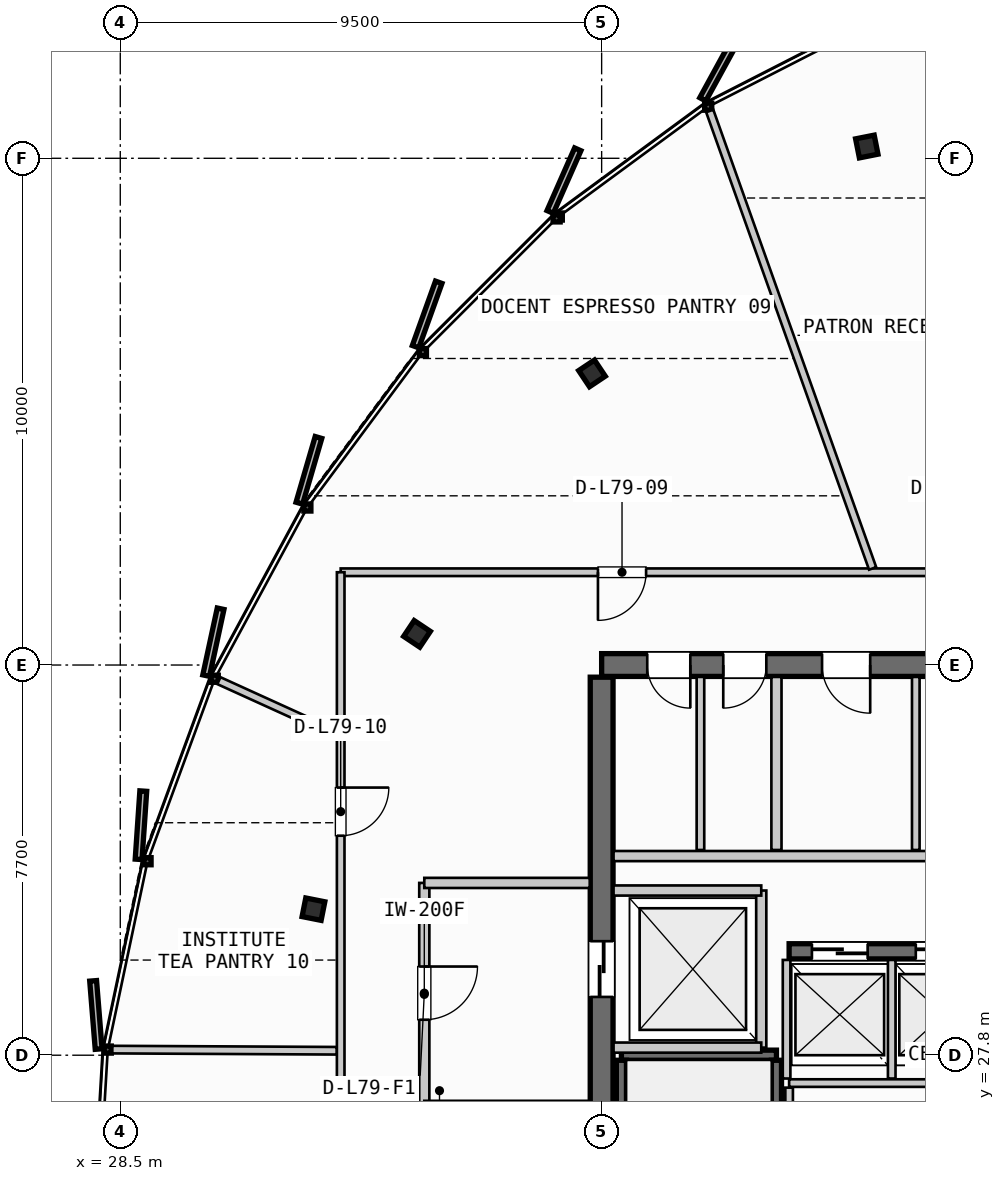
"""IFC4 building model, lengths in metres.
Left out: names, types, materials, properties, quantities, classifications, styles, units other than length and angle.
Written with IfcOpenShell. Run it as: python <this file> out.ifc"""

import sys

from ifc_helpers import new_model, si_unit, direction, frame, frame_2d, origin, origin_2d, place, context, subcontext, project, spatial, rectangle, i_section, extrude, source, transform, mapped, element, fill, save


model = new_model("IFC4")
c1 = context("Model", 3, precision=1e-05, world=origin(), true_north=direction((0.0, 1.0)))
c2 = subcontext(c1, "Body", "Model", "MODEL_VIEW")
j1 = project(units=[si_unit("LENGTHUNIT", "METRE"), si_unit("PLANEANGLEUNIT", "RADIAN")], contexts=[c1])
p1 = place(None, origin())
s1 = spatial("IfcSite", under=j1, at=p1, CompositionType="ELEMENT")
p2 = place(p1, origin())
s2 = spatial("IfcBuilding", under=s1, at=p2, CompositionType="ELEMENT")
p3 = place(p2, frame((0.0, 0.0, 297.4)))
s3 = spatial("IfcBuildingStorey", under=s2, at=p3, CompositionType="ELEMENT", Elevation=297.4)
p4 = place(p3, frame((55.6, 35.5, 0.0), z_axis=(0.0, 0.0, 1.0), x_axis=(-1.0, 0.0, 0.0)))
e1 = element("IfcWall", 1, at=p4, inside=s3, PredefinedType="SHEAR", context=c2, shape_type="SweptSolid", body=[
    extrude(rectangle(XDim=17.6, YDim=0.45, at=frame_2d((8.8, 0.0))), origin(), (0.0, 0.0, 1.0), 3.21),
])
p5 = place(p4, frame((8.05, 0.0, 0.0)))
e2 = element("IfcOpeningElement", 2, at=p5, cuts=e1, PredefinedType="OPENING", context=c2, shape_type="SweptSolid", body=[
    extrude(rectangle(XDim=1.5, YDim=2.2, at=frame_2d((0.75, 1.1))), frame((0.0, 0.235, 0.0), z_axis=(0.0, -1.0, 0.0), x_axis=(1.0, 0.0, 0.0)), (0.0, 0.0, 1.0), 0.47),
])
p6 = place(p4, frame((15.85, 0.0, 0.0)))
e3 = element("IfcOpeningElement", 3, at=p6, cuts=e1, PredefinedType="OPENING", context=c2, shape_type="SweptSolid", body=[
    extrude(rectangle(XDim=0.85, YDim=2.15, at=frame_2d((0.425, 1.075))), frame((0.0, 0.235, 0.0), z_axis=(0.0, -1.0, 0.0), x_axis=(1.0, 0.0, 0.0)), (0.0, 0.0, 1.0), 0.47),
])
p7 = place(p4, frame((14.35, 0.0, 0.0)))
e4 = element("IfcOpeningElement", 4, at=p7, cuts=e1, PredefinedType="OPENING", context=c2, shape_type="SweptSolid", body=[
    extrude(rectangle(XDim=0.85, YDim=2.15, at=frame_2d((0.425, 1.075))), frame((0.0, 0.235, 0.0), z_axis=(0.0, -1.0, 0.0), x_axis=(1.0, 0.0, 0.0)), (0.0, 0.0, 1.0), 0.47),
])
p8 = place(p4, frame((12.3, 0.0, 0.0)))
e5 = element("IfcOpeningElement", 5, at=p8, cuts=e1, PredefinedType="OPENING", context=c2, shape_type="SweptSolid", body=[
    extrude(rectangle(XDim=0.95, YDim=2.15, at=frame_2d((0.475, 1.075))), frame((0.0, 0.235, 0.0), z_axis=(0.0, -1.0, 0.0), x_axis=(1.0, 0.0, 0.0)), (0.0, 0.0, 1.0), 0.47),
])
p9 = place(p4, frame((10.2, 0.0, 0.0)))
e6 = element("IfcOpeningElement", 6, at=p9, cuts=e1, PredefinedType="OPENING", context=c2, shape_type="SweptSolid", body=[
    extrude(rectangle(XDim=0.9, YDim=2.15, at=frame_2d((0.45, 1.075))), frame((0.0, 0.235, 0.0), z_axis=(0.0, -1.0, 0.0), x_axis=(1.0, 0.0, 0.0)), (0.0, 0.0, 1.0), 0.47),
])
p10 = place(p3, frame((38.0, 35.26, 0.0), z_axis=(0.0, 0.0, 1.0), x_axis=(0.0, -1.0, 0.0)))
e7 = element("IfcWall", 7, at=p10, inside=s3, PredefinedType="SHEAR", context=c2, shape_type="SweptSolid", body=[
    extrude(rectangle(XDim=14.92, YDim=0.45, at=frame_2d((7.46, 0.0))), origin(), (0.0, 0.0, 1.0), 3.21),
])
p11 = place(p10, frame((5.21, 0.0, 0.0)))
e8 = element("IfcOpeningElement", 8, at=p11, cuts=e7, PredefinedType="OPENING", context=c2, shape_type="SweptSolid", body=[
    extrude(rectangle(XDim=1.1, YDim=2.2, at=frame_2d((0.55, 1.1))), frame((0.0, 0.235, 0.0), z_axis=(0.0, -1.0, 0.0), x_axis=(1.0, 0.0, 0.0)), (0.0, 0.0, 1.0), 0.47),
])
p12 = place(p3, frame((41.7, 29.85, 0.0), z_axis=(0.0, 0.0, 1.0), x_axis=(1.0, 0.0, 0.0)))
e9 = element("IfcWall", 9, at=p12, inside=s3, PredefinedType="SHEAR", context=c2, shape_type="SweptSolid", body=[
    extrude(rectangle(XDim=4.25, YDim=0.3, at=frame_2d((2.125, 0.0))), origin(), (0.0, 0.0, 1.0), 3.21),
])
p13 = place(p12, frame((0.45, 0.0, 0.0)))
e10 = element("IfcOpeningElement", 10, at=p13, cuts=e9, PredefinedType="OPENING", context=c2, shape_type="SweptSolid", body=[
    extrude(rectangle(XDim=1.1, YDim=2.2, at=frame_2d((0.55, 1.1))), frame((0.0, 0.16, 0.0), z_axis=(0.0, -1.0, 0.0), x_axis=(1.0, 0.0, 0.0)), (0.0, 0.0, 1.0), 0.32),
])
p14 = place(p12, frame((2.5, 0.0, 0.0)))
e11 = element("IfcOpeningElement", 11, at=p14, cuts=e9, PredefinedType="OPENING", context=c2, shape_type="SweptSolid", body=[
    extrude(rectangle(XDim=1.1, YDim=2.2, at=frame_2d((0.55, 1.1))), frame((0.0, 0.16, 0.0), z_axis=(0.0, -1.0, 0.0), x_axis=(1.0, 0.0, 0.0)), (0.0, 0.0, 1.0), 0.32),
])
m1 = source(origin(), c2, "Body", "SweptSolid", [
    extrude(i_section(OverallWidth=0.374, OverallDepth=0.383, WebThickness=0.017, FlangeThickness=0.026, FilletRadius=0.015, at=origin_2d()), origin(), (0.0, 0.0, 1.0), 3.21),
])
for number, where, z_axis, x_axis in (
    (12, (43.233, 45.732, 0.0), (0.0, 0.0, 1.0), (-0.195, 0.981, 0.0)),
    (13, (37.81, 41.255, 0.0), (0.0, 0.0, 1.0), (-0.556, 0.831, 0.0)),
    (14, (34.356, 36.115, 0.0), (0.0, 0.0, 1.0), (-0.831, 0.556, 0.0)),
    (15, (32.312, 30.682, 0.0), (0.0, 0.0, 1.0), (-0.981, 0.195, 0.0)),
):
    element("IfcColumn", number, at=place(p3, frame(where, z_axis=z_axis, x_axis=x_axis)), inside=s3, PredefinedType="COLUMN", context=c2, shape_type="MappedRepresentation", body=[
        mapped(m1, transform((0.0, 0.0, 0.0), scale=1.0)),
    ])
p15 = place(p3, frame((38.39, 27.8, 0.0), z_axis=(0.0, 0.0, 1.0), x_axis=(1.0, 0.0, 0.0)))
e16 = element("IfcWall", 16, at=p15, inside=s3, PredefinedType="SHEAR", context=c2, shape_type="SweptSolid", body=[
    extrude(rectangle(XDim=3.06, YDim=0.2, at=frame_2d((1.53, 0.0))), origin(), (0.0, 0.0, 1.0), 3.21),
])
for number, where, z_axis, x_axis in (
    (17, (41.45, 27.7, 0.0), (0.0, 0.0, 1.0), (0.0, -1.0, 0.0)),
    (18, (38.39, 20.35, 0.0), (0.0, 0.0, 1.0), (0.0, 1.0, 0.0)),
):
    element("IfcWall", number, at=place(p3, frame(where, z_axis=z_axis, x_axis=x_axis)), inside=s3, PredefinedType="SHEAR", context=c2, shape_type="SweptSolid", body=[
        extrude(rectangle(XDim=7.35, YDim=0.2, at=frame_2d((3.675, 0.0))), origin(), (0.0, 0.0, 1.0), 3.21),
    ])
p16 = place(p3, frame((41.15, 27.95, 0.0), z_axis=(0.0, 0.0, 1.0), x_axis=(0.0, 1.0, 0.0)))
e19 = element("IfcWall", 19, at=p16, inside=s3, PredefinedType="PARTITIONING", context=c2, shape_type="SweptSolid", body=[
    extrude(rectangle(XDim=3.1, YDim=0.2, at=frame_2d((1.55, 0.0))), origin(), (0.0, 0.0, 1.0), 2.28),
])
for number, where, z_axis, x_axis in (
    (20, (38.235, 27.95, 0.0), (0.0, 0.0, 1.0), (1.0, 0.0, 0.0)),
    (21, (38.235, 31.05, 0.0), (0.0, 0.0, 1.0), (1.0, 0.0, 0.0)),
):
    element("IfcWall", number, at=place(p3, frame(where, z_axis=z_axis, x_axis=x_axis)), inside=s3, PredefinedType="PARTITIONING", context=c2, shape_type="SweptSolid", body=[
        extrude(rectangle(XDim=2.915, YDim=0.2, at=frame_2d((1.458, 0.0))), origin(), (0.0, 0.0, 1.0), 2.28),
    ])
p17 = place(p3, frame((34.5, 31.2, 0.0), z_axis=(0.0, 0.0, 1.0), x_axis=(0.0, -1.0, 0.0)))
e22 = element("IfcWall", 22, at=p17, inside=s3, PredefinedType="PARTITIONING", context=c2, shape_type="SweptSolid", body=[
    extrude(rectangle(XDim=4.4, YDim=0.2, at=frame_2d((2.2, 0.0))), origin(), (0.0, 0.0, 1.0), 2.28),
])
p18 = place(p17, frame((1.65, 0.0, 0.0)))
e23 = element("IfcOpeningElement", 23, at=p18, cuts=e22, PredefinedType="OPENING", context=c2, shape_type="SweptSolid", body=[
    extrude(rectangle(XDim=1.05, YDim=2.15, at=frame_2d((0.525, 1.075))), frame((0.0, 0.11, 0.0), z_axis=(0.0, -1.0, 0.0), x_axis=(1.0, 0.0, 0.0)), (0.0, 0.0, 1.0), 0.22),
])
for number, where, z_axis, x_axis in (
    (24, (34.5, 26.8, 0.0), (0.0, 0.0, 1.0), (1.0, 0.0, 0.0)),
    (25, (34.5, 31.2, 0.0), (0.0, 0.0, 1.0), (1.0, 0.0, 0.0)),
):
    element("IfcWall", number, at=place(p3, frame(where, z_axis=z_axis, x_axis=x_axis)), inside=s3, PredefinedType="PARTITIONING", context=c2, shape_type="SweptSolid", body=[
        extrude(rectangle(XDim=3.265, YDim=0.2, at=frame_2d((1.632, 0.0))), origin(), (0.0, 0.0, 1.0), 2.28),
    ])
p19 = place(p3, frame((41.7, 27.25, 0.0), z_axis=(0.0, 0.0, 1.0), x_axis=(1.0, 0.0, 0.0)))
e26 = element("IfcWall", 26, at=p19, inside=s3, PredefinedType="PARTITIONING", context=c2, shape_type="SweptSolid", body=[
    extrude(rectangle(XDim=4.25, YDim=0.15, at=frame_2d((2.125, 0.0))), origin(), (0.0, 0.0, 1.0), 2.28),
])
p20 = place(p3, frame((41.7, 24.92, 0.0), z_axis=(0.0, 0.0, 1.0), x_axis=(0.0, 1.0, 0.0)))
e27 = element("IfcWall", 27, at=p20, inside=s3, PredefinedType="PARTITIONING", context=c2, shape_type="SweptSolid", body=[
    extrude(rectangle(XDim=2.24, YDim=0.15, at=frame_2d((1.12, 0.0))), origin(), (0.0, 0.0, 1.0), 2.28),
])
for number, where, z_axis, x_axis in (
    (28, (41.65, 27.34, 0.0), (0.0, 0.0, 1.0), (0.0, 1.0, 0.0)),
    (29, (43.725, 27.34, 0.0), (0.0, 0.0, 1.0), (0.0, 1.0, 0.0)),
):
    element("IfcWall", number, at=place(p3, frame(where, z_axis=z_axis, x_axis=x_axis)), inside=s3, PredefinedType="PARTITIONING", context=c2, shape_type="SweptSolid", body=[
        extrude(rectangle(XDim=2.34, YDim=0.15, at=frame_2d((1.17, 0.0))), origin(), (0.0, 0.0, 1.0), 2.28),
    ])
p21 = place(p3, frame((41.45, 31.85, 0.0), z_axis=(0.0, 0.0, 1.0), x_axis=(0.0, 1.0, 0.0)))
e30 = element("IfcWall", 30, at=p21, inside=s3, PredefinedType="PARTITIONING", context=c2, shape_type="SweptSolid", body=[
    extrude(rectangle(XDim=3.415, YDim=0.2, at=frame_2d((1.708, 0.0))), origin(), (0.0, 0.0, 1.0), 2.28),
])
p22 = place(p3, frame((38.235, 31.73, 0.0), z_axis=(0.0, 0.0, 1.0), x_axis=(1.0, 0.0, 0.0)))
e31 = element("IfcWall", 31, at=p22, inside=s3, PredefinedType="PARTITIONING", context=c2, shape_type="SweptSolid", body=[
    extrude(rectangle(XDim=7.565, YDim=0.2, at=frame_2d((3.782, 0.0))), origin(), (0.0, 0.0, 1.0), 2.28),
])
p23 = place(p3, frame((39.95, 31.85, 0.0), z_axis=(0.0, 0.0, 1.0), x_axis=(0.0, 1.0, 0.0)))
e32 = element("IfcWall", 32, at=p23, inside=s3, PredefinedType="PARTITIONING", context=c2, shape_type="SweptSolid", body=[
    extrude(rectangle(XDim=3.415, YDim=0.15, at=frame_2d((1.708, 0.0))), origin(), (0.0, 0.0, 1.0), 2.28),
])
p24 = place(p3, frame((44.2, 31.85, 0.0), z_axis=(0.0, 0.0, 1.0), x_axis=(0.0, 1.0, 0.0)))
e33 = element("IfcWall", 33, at=p24, inside=s3, PredefinedType="PLUMBINGWALL", context=c2, shape_type="SweptSolid", body=[
    extrude(rectangle(XDim=3.415, YDim=0.15, at=frame_2d((1.708, 0.0))), origin(), (0.0, 0.0, 1.0), 2.28),
])
p25 = place(p3, frame((60.888, 37.331, 0.0), z_axis=(0.0, 0.0, 1.0), x_axis=(-1.0, 0.0, 0.0)))
e34 = element("IfcWall", 34, at=p25, inside=s3, PredefinedType="PARTITIONING", context=c2, shape_type="SweptSolid", body=[
    extrude(rectangle(XDim=28.038, YDim=0.15, at=frame_2d((14.019, 0.0))), origin(), (0.0, 0.0, 1.0), 2.28),
])
p26 = place(p25, frame((3.903, 0.0, 0.0)))
e35 = element("IfcOpeningElement", 35, at=p26, cuts=e34, PredefinedType="OPENING", context=c2, shape_type="SweptSolid", body=[
    extrude(rectangle(XDim=0.95, YDim=2.15, at=frame_2d((0.475, 1.075))), frame((0.0, 0.085, 0.0), z_axis=(0.0, -1.0, 0.0), x_axis=(1.0, 0.0, 0.0)), (0.0, 0.0, 1.0), 0.17),
])
p27 = place(p25, frame((9.534, 0.0, 0.0)))
e36 = element("IfcOpeningElement", 36, at=p27, cuts=e34, PredefinedType="OPENING", context=c2, shape_type="SweptSolid", body=[
    extrude(rectangle(XDim=0.95, YDim=2.15, at=frame_2d((0.475, 1.075))), frame((0.0, 0.085, 0.0), z_axis=(0.0, -1.0, 0.0), x_axis=(1.0, 0.0, 0.0)), (0.0, 0.0, 1.0), 0.17),
])
p28 = place(p25, frame((15.393, 0.0, 0.0)))
e37 = element("IfcOpeningElement", 37, at=p28, cuts=e34, PredefinedType="OPENING", context=c2, shape_type="SweptSolid", body=[
    extrude(rectangle(XDim=0.95, YDim=2.15, at=frame_2d((0.475, 1.075))), frame((0.0, 0.085, 0.0), z_axis=(0.0, -1.0, 0.0), x_axis=(1.0, 0.0, 0.0)), (0.0, 0.0, 1.0), 0.17),
])
p29 = place(p25, frame((22.011, 0.0, 0.0)))
e38 = element("IfcOpeningElement", 38, at=p29, cuts=e34, PredefinedType="OPENING", context=c2, shape_type="SweptSolid", body=[
    extrude(rectangle(XDim=0.95, YDim=2.15, at=frame_2d((0.475, 1.075))), frame((0.0, 0.085, 0.0), z_axis=(0.0, -1.0, 0.0), x_axis=(1.0, 0.0, 0.0)), (0.0, 0.0, 1.0), 0.17),
])
p30 = place(p3, frame((32.85, 37.331, 0.0), z_axis=(0.0, 0.0, 1.0), x_axis=(0.0, -1.0, 0.0)))
e39 = element("IfcWall", 39, at=p30, inside=s3, PredefinedType="PARTITIONING", context=c2, shape_type="SweptSolid", body=[
    extrude(rectangle(XDim=19.524, YDim=0.15, at=frame_2d((9.762, 0.0))), origin(), (0.0, 0.0, 1.0), 2.28),
])
p31 = place(p30, frame((4.249, 0.0, 0.0)))
e40 = element("IfcOpeningElement", 40, at=p31, cuts=e39, PredefinedType="OPENING", context=c2, shape_type="SweptSolid", body=[
    extrude(rectangle(XDim=0.95, YDim=2.15, at=frame_2d((0.475, 1.075))), frame((0.0, 0.085, 0.0), z_axis=(0.0, -1.0, 0.0), x_axis=(1.0, 0.0, 0.0)), (0.0, 0.0, 1.0), 0.17),
])
p32 = place(p30, frame((13.719, 0.0, 0.0)))
e41 = element("IfcOpeningElement", 41, at=p32, cuts=e39, PredefinedType="OPENING", context=c2, shape_type="SweptSolid", body=[
    extrude(rectangle(XDim=0.95, YDim=2.15, at=frame_2d((0.475, 1.075))), frame((0.0, 0.085, 0.0), z_axis=(0.0, -1.0, 0.0), x_axis=(1.0, 0.0, 0.0)), (0.0, 0.0, 1.0), 0.17),
])
p33 = place(p3, frame((43.348, 37.406, 0.0), z_axis=(0.0, 0.0, 1.0), x_axis=(-0.335438877296, 0.94206197227, 0.0)))
e42 = element("IfcWall", 42, at=p33, inside=s3, PredefinedType="PARTITIONING", context=c2, shape_type="SweptSolid", body=[
    extrude(rectangle(XDim=9.583, YDim=0.15, at=frame_2d((4.791, 0.0))), origin(), (0.0, 0.0, 1.0), 2.28),
])
p34 = place(p3, frame((32.777, 34.132, 0.0), z_axis=(0.0, 0.0, 1.0), x_axis=(-0.910310968639, 0.413925041976, 0.0)))
e43 = element("IfcWall", 43, at=p34, inside=s3, PredefinedType="PARTITIONING", context=c2, shape_type="SweptSolid", body=[
    extrude(rectangle(XDim=2.561, YDim=0.15, at=frame_2d((1.281, 0.0))), origin(), (0.0, 0.0, 1.0), 2.28),
])
p35 = place(p3, frame((32.77, 27.888, 0.0), z_axis=(0.0, 0.0, 1.0), x_axis=(-0.999986848115, 0.005128703296, 0.0)))
e44 = element("IfcWall", 44, at=p35, inside=s3, PredefinedType="PARTITIONING", context=c2, shape_type="SweptSolid", body=[
    extrude(rectangle(XDim=4.427, YDim=0.15, at=frame_2d((2.213, 0.0))), origin(), (0.0, 0.0, 1.0), 2.28),
])
m2 = source(origin(), c2, "Body", "SweptSolid", [
    extrude(rectangle(XDim=1.1, YDim=2.2, at=frame_2d((0.55, 1.1))), frame((0.0, 0.025, 0.0), z_axis=(0.0, -1.0, 0.0), x_axis=(1.0, 0.0, 0.0)), (0.0, 0.0, 1.0), 0.05),
])
p36 = place(p11, origin())
e45 = element("IfcDoor", 45, at=p36, inside=s3, OperationType="SLIDING_TO_LEFT", PredefinedType="DOOR", context=c2, shape_type="MappedRepresentation", body=[
    mapped(m2, transform((0.0, 0.0, 0.0), scale=1.0)),
])
fill(e8, e45)
p37 = place(p13, origin())
e46 = element("IfcDoor", 46, at=p37, inside=s3, OperationType="SLIDING_TO_LEFT", PredefinedType="DOOR", context=c2, shape_type="MappedRepresentation", body=[
    mapped(m2, transform((0.0, 0.0, 0.0), scale=1.0)),
])
fill(e10, e46)
p38 = place(p14, origin())
e47 = element("IfcDoor", 47, at=p38, inside=s3, OperationType="SLIDING_TO_LEFT", PredefinedType="DOOR", context=c2, shape_type="MappedRepresentation", body=[
    mapped(m2, transform((0.0, 0.0, 0.0), scale=1.0)),
])
fill(e11, e47)
m3 = source(origin(), c2, "Body", "SweptSolid", [
    extrude(rectangle(XDim=0.85, YDim=2.15, at=frame_2d((0.425, 1.075))), frame((0.0, 0.025, 0.0), z_axis=(0.0, -1.0, 0.0), x_axis=(1.0, 0.0, 0.0)), (0.0, 0.0, 1.0), 0.05),
])
p39 = place(p6, origin())
e48 = element("IfcDoor", 48, at=p39, inside=s3, OperationType="SINGLE_SWING_LEFT", PredefinedType="DOOR", context=c2, shape_type="MappedRepresentation", body=[
    mapped(m3, transform((0.0, 0.0, 0.0), scale=1.0)),
])
fill(e3, e48)
p40 = place(p7, origin())
e49 = element("IfcDoor", 49, at=p40, inside=s3, OperationType="SINGLE_SWING_RIGHT", PredefinedType="DOOR", context=c2, shape_type="MappedRepresentation", body=[
    mapped(m3, transform((0.0, 0.0, 0.0), scale=1.0)),
])
fill(e4, e49)
m4 = source(origin(), c2, "Body", "SweptSolid", [
    extrude(rectangle(XDim=0.95, YDim=2.15, at=frame_2d((0.475, 1.075))), frame((0.0, 0.025, 0.0), z_axis=(0.0, -1.0, 0.0), x_axis=(1.0, 0.0, 0.0)), (0.0, 0.0, 1.0), 0.05),
])
p41 = place(p8, origin())
e50 = element("IfcDoor", 50, at=p41, inside=s3, OperationType="SINGLE_SWING_LEFT", PredefinedType="DOOR", context=c2, shape_type="MappedRepresentation", body=[
    mapped(m4, transform((0.0, 0.0, 0.0), scale=1.0)),
])
fill(e5, e50)
m5 = source(origin(), c2, "Body", "SweptSolid", [
    extrude(rectangle(XDim=1.05, YDim=2.15, at=frame_2d((0.525, 1.075))), frame((0.0, 0.025, 0.0), z_axis=(0.0, -1.0, 0.0), x_axis=(1.0, 0.0, 0.0)), (0.0, 0.0, 1.0), 0.05),
])
p42 = place(p18, origin())
e51 = element("IfcDoor", 51, at=p42, inside=s3, OperationType="SINGLE_SWING_LEFT", PredefinedType="DOOR", context=c2, shape_type="MappedRepresentation", body=[
    mapped(m5, transform((0.0, 0.0, 0.0), scale=1.0)),
])
fill(e23, e51)
p43 = place(p29, origin())
e52 = element("IfcDoor", 52, at=p43, inside=s3, OperationType="SINGLE_SWING_RIGHT", PredefinedType="DOOR", context=c2, shape_type="MappedRepresentation", body=[
    mapped(m4, transform((0.0, 0.0, 0.0), scale=1.0)),
])
fill(e38, e52)
p44 = place(p31, origin())
e53 = element("IfcDoor", 53, at=p44, inside=s3, OperationType="SINGLE_SWING_LEFT", PredefinedType="DOOR", context=c2, shape_type="MappedRepresentation", body=[
    mapped(m4, transform((0.0, 0.0, 0.0), scale=1.0)),
])
fill(e40, e53)
save(model, sys.argv[1])
